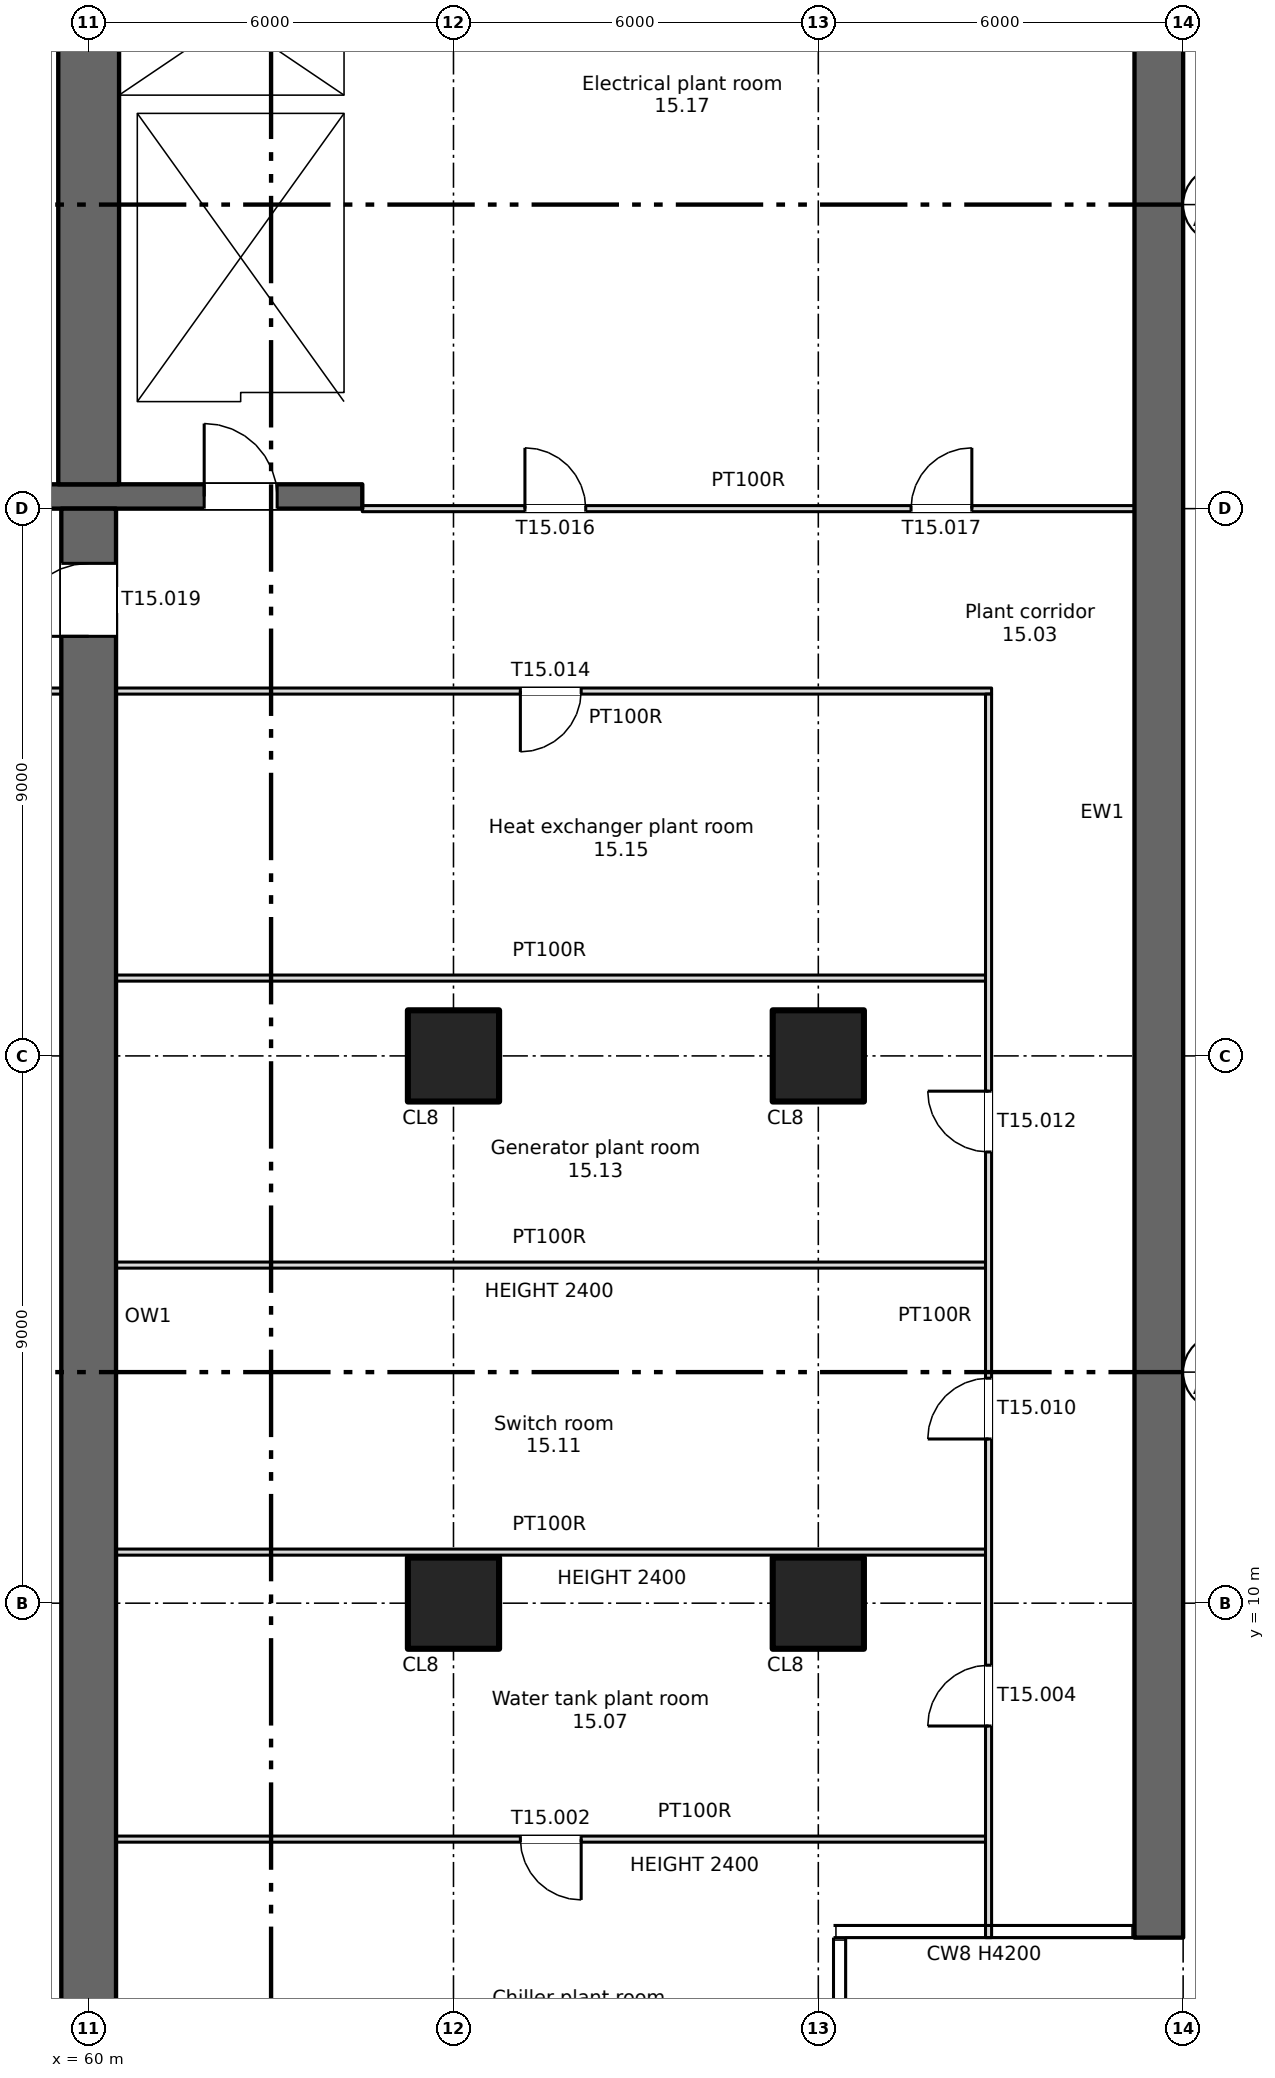
"""IFC4 building model, lengths in metres.
Left out: names, types, materials, properties, quantities, classifications, styles, units other than length and angle.
Written with IfcOpenShell. Run it as: python <this file> out.ifc"""

import sys

from ifc_helpers import new_model, si_unit, direction, frame, frame_2d, origin, origin_2d, place, context, subcontext, project, spatial, rectangle, extrude, element, fill, save


model = new_model("IFC4")
c1 = context("Model", 3, precision=1e-05, world=origin(), true_north=direction((0.0, 1.0)))
c2 = subcontext(c1, "Body", "Model", "MODEL_VIEW")
j1 = project(units=[si_unit("LENGTHUNIT", "METRE"), si_unit("PLANEANGLEUNIT", "RADIAN")], contexts=[c1])
p1 = place(None, origin())
s1 = spatial("IfcSite", under=j1, at=p1, CompositionType="ELEMENT")
p2 = place(p1, origin())
s2 = spatial("IfcBuilding", under=s1, at=p2, CompositionType="ELEMENT")
p3 = place(p2, frame((0.0, 0.0, 90.0)))
s3 = spatial("IfcBuildingStorey", under=s2, at=p3, CompositionType="ELEMENT", Elevation=90.0)
for number, where, z_axis, x_axis in (
    (1, (66.0, 10.0, 0.0), (0.0, 0.0, 1.0), (1.0, 0.0, 0.0)),
    (2, (66.0, 19.0, 0.0), (0.0, 0.0, 1.0), (1.0, 0.0, 0.0)),
    (3, (72.0, 10.0, 0.0), (0.0, 0.0, 1.0), (1.0, 0.0, 0.0)),
    (4, (72.0, 19.0, 0.0), (0.0, 0.0, 1.0), (1.0, 0.0, 0.0)),
):
    element("IfcColumn", number, at=place(p3, frame(where, z_axis=z_axis, x_axis=x_axis)), inside=s3, PredefinedType="COLUMN", context=c2, shape_type="SweptSolid", body=[
        extrude(rectangle(XDim=1.5, YDim=1.5, at=origin_2d()), origin(), (0.0, 0.0, 1.0), 4.2),
    ])
p4 = place(p3, frame((77.6, 4.5, 0.0), z_axis=(0.0, 0.0, 1.0), x_axis=(0.0, 1.0, 0.0)))
e5 = element("IfcWall", 5, at=p4, inside=s3, PredefinedType="SHEAR", context=c2, shape_type="SweptSolid", body=[
    extrude(rectangle(XDim=37.0, YDim=0.8, at=frame_2d((18.5, 0.0))), origin(), (0.0, 0.0, 1.0), 4.2),
])
p5 = place(p3, frame((60.0, 1.4, 0.0), z_axis=(0.0, 0.0, 1.0), x_axis=(0.0, 1.0, 0.0)))
e6 = element("IfcWall", 6, at=p5, inside=s3, PredefinedType="SHEAR", context=c2, shape_type="SweptSolid", body=[
    extrude(rectangle(XDim=26.6, YDim=0.9, at=frame_2d((13.3, 0.0))), origin(), (0.0, 0.0, 1.0), 4.2),
])
p6 = place(p5, frame((24.5, 0.0, 0.0)))
e7 = element("IfcOpeningElement", 7, at=p6, cuts=e6, PredefinedType="OPENING", context=c2, shape_type="SweptSolid", body=[
    extrude(rectangle(XDim=1.2, YDim=2.1, at=frame_2d((0.6, 1.05))), frame((0.0, 0.46, 0.0), z_axis=(0.0, -1.0, 0.0), x_axis=(1.0, 0.0, 0.0)), (0.0, 0.0, 1.0), 0.92),
])
p7 = place(p3, frame((6.7, 28.2, 0.0), z_axis=(0.0, 0.0, 1.0), x_axis=(1.0, 0.0, 0.0)))
e8 = element("IfcWall", 8, at=p7, inside=s3, PredefinedType="SHEAR", context=c2, shape_type="SweptSolid", body=[
    extrude(rectangle(XDim=57.8, YDim=0.4, at=frame_2d((28.9, 0.0))), origin(), (0.0, 0.0, 1.0), 4.2),
])
p8 = place(p7, frame((13.85, 0.0, 0.0)))
e9 = element("IfcOpeningElement", 9, at=p8, cuts=e8, PredefinedType="OPENING", context=c2, shape_type="SweptSolid", body=[
    extrude(rectangle(XDim=0.9, YDim=2.1, at=frame_2d((0.45, 1.05))), frame((0.0, 0.21, 0.0), z_axis=(0.0, -1.0, 0.0), x_axis=(1.0, 0.0, 0.0)), (0.0, 0.0, 1.0), 0.42),
])
p9 = place(p7, frame((49.85, 0.0, 0.0)))
e10 = element("IfcOpeningElement", 10, at=p9, cuts=e8, PredefinedType="OPENING", context=c2, shape_type="SweptSolid", body=[
    extrude(rectangle(XDim=0.9, YDim=2.1, at=frame_2d((0.45, 1.05))), frame((0.0, 0.21, 0.0), z_axis=(0.0, -1.0, 0.0), x_axis=(1.0, 0.0, 0.0)), (0.0, 0.0, 1.0), 0.42),
])
p10 = place(p7, frame((1.35, 0.0, 0.0)))
e11 = element("IfcOpeningElement", 11, at=p10, cuts=e8, PredefinedType="OPENING", context=c2, shape_type="SweptSolid", body=[
    extrude(rectangle(XDim=0.9, YDim=2.1, at=frame_2d((0.45, 1.05))), frame((0.0, 0.21, 0.0), z_axis=(0.0, -1.0, 0.0), x_axis=(1.0, 0.0, 0.0)), (0.0, 0.0, 1.0), 0.42),
])
p11 = place(p7, frame((4.7, 0.0, 0.0)))
e12 = element("IfcOpeningElement", 12, at=p11, cuts=e8, PredefinedType="OPENING", context=c2, shape_type="SweptSolid", body=[
    extrude(rectangle(XDim=1.2, YDim=2.1, at=frame_2d((0.6, 1.05))), frame((0.0, 0.21, 0.0), z_axis=(0.0, -1.0, 0.0), x_axis=(1.0, 0.0, 0.0)), (0.0, 0.0, 1.0), 0.42),
])
p12 = place(p7, frame((31.7, 0.0, 0.0)))
e13 = element("IfcOpeningElement", 13, at=p12, cuts=e8, PredefinedType="OPENING", context=c2, shape_type="SweptSolid", body=[
    extrude(rectangle(XDim=1.2, YDim=2.1, at=frame_2d((0.6, 1.05))), frame((0.0, 0.21, 0.0), z_axis=(0.0, -1.0, 0.0), x_axis=(1.0, 0.0, 0.0)), (0.0, 0.0, 1.0), 0.42),
])
p13 = place(p7, frame((55.2, 0.0, 0.0)))
e14 = element("IfcOpeningElement", 14, at=p13, cuts=e8, PredefinedType="OPENING", context=c2, shape_type="SweptSolid", body=[
    extrude(rectangle(XDim=1.2, YDim=2.1, at=frame_2d((0.6, 1.05))), frame((0.0, 0.21, 0.0), z_axis=(0.0, -1.0, 0.0), x_axis=(1.0, 0.0, 0.0)), (0.0, 0.0, 1.0), 0.42),
])
p14 = place(p7, frame((21.7, 0.0, 0.0)))
e15 = element("IfcOpeningElement", 15, at=p14, cuts=e8, PredefinedType="OPENING", context=c2, shape_type="SweptSolid", body=[
    extrude(rectangle(XDim=1.2, YDim=2.1, at=frame_2d((0.6, 1.05))), frame((0.0, 0.21, 0.0), z_axis=(0.0, -1.0, 0.0), x_axis=(1.0, 0.0, 0.0)), (0.0, 0.0, 1.0), 0.42),
])
p15 = place(p7, frame((41.7, 0.0, 0.0)))
e16 = element("IfcOpeningElement", 16, at=p15, cuts=e8, PredefinedType="OPENING", context=c2, shape_type="SweptSolid", body=[
    extrude(rectangle(XDim=1.2, YDim=2.1, at=frame_2d((0.6, 1.05))), frame((0.0, 0.21, 0.0), z_axis=(0.0, -1.0, 0.0), x_axis=(1.0, 0.0, 0.0)), (0.0, 0.0, 1.0), 0.42),
])
p16 = place(p7, frame((24.85, 0.0, 0.0)))
e17 = element("IfcOpeningElement", 17, at=p16, cuts=e8, PredefinedType="OPENING", context=c2, shape_type="SweptSolid", body=[
    extrude(rectangle(XDim=2.4, YDim=2.1, at=frame_2d((1.2, 1.05))), frame((0.0, 0.21, 0.0), z_axis=(0.0, -1.0, 0.0), x_axis=(1.0, 0.0, 0.0)), (0.0, 0.0, 1.0), 0.42),
])
p17 = place(p7, frame((37.35, 0.0, 0.0)))
e18 = element("IfcOpeningElement", 18, at=p17, cuts=e8, PredefinedType="OPENING", context=c2, shape_type="SweptSolid", body=[
    extrude(rectangle(XDim=2.4, YDim=2.1, at=frame_2d((1.2, 1.05))), frame((0.0, 0.21, 0.0), z_axis=(0.0, -1.0, 0.0), x_axis=(1.0, 0.0, 0.0)), (0.0, 0.0, 1.0), 0.42),
])
p18 = place(p7, frame((7.85, 0.0, 0.0)))
e19 = element("IfcOpeningElement", 19, at=p18, cuts=e8, PredefinedType="OPENING", context=c2, shape_type="SweptSolid", body=[
    extrude(rectangle(XDim=2.4, YDim=2.1, at=frame_2d((1.2, 1.05))), frame((0.0, 0.21, 0.0), z_axis=(0.0, -1.0, 0.0), x_axis=(1.0, 0.0, 0.0)), (0.0, 0.0, 1.0), 0.42),
])
p19 = place(p7, frame((28.85, 0.0, 0.0)))
e20 = element("IfcOpeningElement", 20, at=p19, cuts=e8, PredefinedType="OPENING", context=c2, shape_type="SweptSolid", body=[
    extrude(rectangle(XDim=0.9, YDim=2.1, at=frame_2d((0.45, 1.05))), frame((0.0, 0.21, 0.0), z_axis=(0.0, -1.0, 0.0), x_axis=(1.0, 0.0, 0.0)), (0.0, 0.0, 1.0), 0.42),
])
p20 = place(p7, frame((34.85, 0.0, 0.0)))
e21 = element("IfcOpeningElement", 21, at=p20, cuts=e8, PredefinedType="OPENING", context=c2, shape_type="SweptSolid", body=[
    extrude(rectangle(XDim=0.9, YDim=2.1, at=frame_2d((0.45, 1.05))), frame((0.0, 0.21, 0.0), z_axis=(0.0, -1.0, 0.0), x_axis=(1.0, 0.0, 0.0)), (0.0, 0.0, 1.0), 0.42),
])
p21 = place(p3, frame((64.35, 34.8, 0.0), z_axis=(0.0, 0.0, 1.0), x_axis=(0.0, 1.0, 0.0)))
e22 = element("IfcWall", 22, at=p21, inside=s3, PredefinedType="SHEAR", context=c2, shape_type="SweptSolid", body=[
    extrude(rectangle(XDim=10.2, YDim=0.3, at=frame_2d((5.1, 0.0))), origin(), (0.0, 0.0, 1.0), 4.2),
])
p22 = place(p3, frame((60.0, 28.4, 0.0), z_axis=(0.0, 0.0, 1.0), x_axis=(0.0, 1.0, 0.0)))
e23 = element("IfcWall", 23, at=p22, inside=s3, PredefinedType="SHEAR", context=c2, shape_type="SweptSolid", body=[
    extrude(rectangle(XDim=16.6, YDim=1.0, at=frame_2d((8.3, 0.0))), origin(), (0.0, 0.0, 1.0), 4.2),
])
p23 = place(p22, frame((9.6, 0.0, 0.0)))
e24 = element("IfcOpeningElement", 24, at=p23, cuts=e23, PredefinedType="OPENING", context=c2, shape_type="SweptSolid", body=[
    extrude(rectangle(XDim=2.0, YDim=2.1, at=frame_2d((1.0, 1.05))), frame((0.0, 0.51, 0.0), z_axis=(0.0, -1.0, 0.0), x_axis=(1.0, 0.0, 0.0)), (0.0, 0.0, 1.0), 1.02),
])
p24 = place(p22, frame((15.25, 0.0, 0.0)))
e25 = element("IfcOpeningElement", 25, at=p24, cuts=e23, PredefinedType="OPENING", context=c2, shape_type="SweptSolid", body=[
    extrude(rectangle(XDim=1.2, YDim=2.1, at=frame_2d((0.6, 1.05))), frame((0.0, 0.51, 0.0), z_axis=(0.0, -1.0, 0.0), x_axis=(1.0, 0.0, 0.0)), (0.0, 0.0, 1.0), 1.02),
])
for number, where, z_axis, x_axis in (
    (26, (60.65, 28.4, 0.0), (0.0, 0.0, 1.0), (0.0, 1.0, 0.0)),
    (27, (64.35, 28.4, 0.0), (0.0, 0.0, 1.0), (0.0, 1.0, 0.0)),
):
    element("IfcWall", number, at=place(p3, frame(where, z_axis=z_axis, x_axis=x_axis)), inside=s3, PredefinedType="SHEAR", context=c2, shape_type="SweptSolid", body=[
        extrude(rectangle(XDim=6.1, YDim=0.3, at=frame_2d((3.05, 0.0))), origin(), (0.0, 0.0, 1.0), 4.2),
    ])
p25 = place(p3, frame((47.3, 34.65, 0.0), z_axis=(0.0, 0.0, 1.0), x_axis=(1.0, 0.0, 0.0)))
e28 = element("IfcWall", 28, at=p25, inside=s3, PredefinedType="SHEAR", context=c2, shape_type="SweptSolid", body=[
    extrude(rectangle(XDim=12.2, YDim=0.3, at=frame_2d((6.1, 0.0))), origin(), (0.0, 0.0, 1.0), 4.2),
])
p26 = place(p25, frame((1.3, 0.0, 0.0)))
e29 = element("IfcOpeningElement", 29, at=p26, cuts=e28, PredefinedType="OPENING", context=c2, shape_type="SweptSolid", body=[
    extrude(rectangle(XDim=1.1, YDim=2.1, at=frame_2d((0.55, 1.05))), frame((0.0, 0.16, 0.0), z_axis=(0.0, -1.0, 0.0), x_axis=(1.0, 0.0, 0.0)), (0.0, 0.0, 1.0), 0.32),
])
p27 = place(p3, frame((60.5, 34.65, 0.0), z_axis=(0.0, 0.0, 1.0), x_axis=(1.0, 0.0, 0.0)))
e30 = element("IfcWall", 30, at=p27, inside=s3, PredefinedType="SHEAR", context=c2, shape_type="SweptSolid", body=[
    extrude(rectangle(XDim=4.0, YDim=0.3, at=frame_2d((2.0, 0.0))), origin(), (0.0, 0.0, 1.0), 4.2),
])
p28 = place(p3, frame((60.4, 6.12, 0.0), z_axis=(0.0, 0.0, 1.0), x_axis=(1.0, 0.0, 0.0)))
e31 = element("IfcWall", 31, at=p28, inside=s3, PredefinedType="PARTITIONING", context=c2, shape_type="SweptSolid", body=[
    extrude(rectangle(XDim=14.35, YDim=0.1, at=frame_2d((7.175, 0.0))), origin(), (0.0, 0.0, 1.0), 2.4),
])
p29 = place(p28, frame((6.7, 0.0, 0.0)))
e32 = element("IfcOpeningElement", 32, at=p29, cuts=e31, PredefinedType="OPENING", context=c2, shape_type="SweptSolid", body=[
    extrude(rectangle(XDim=1.0, YDim=2.1, at=frame_2d((0.5, 1.05))), frame((0.0, 0.06, 0.0), z_axis=(0.0, -1.0, 0.0), x_axis=(1.0, 0.0, 0.0)), (0.0, 0.0, 1.0), 0.12),
])
for number, where, z_axis, x_axis in (
    (33, (60.4, 10.84, 0.0), (0.0, 0.0, 1.0), (1.0, 0.0, 0.0)),
    (34, (60.4, 15.56, 0.0), (0.0, 0.0, 1.0), (1.0, 0.0, 0.0)),
):
    element("IfcWall", number, at=place(p3, frame(where, z_axis=z_axis, x_axis=x_axis)), inside=s3, PredefinedType="PARTITIONING", context=c2, shape_type="SweptSolid", body=[
        extrude(rectangle(XDim=14.35, YDim=0.1, at=frame_2d((7.175, 0.0))), origin(), (0.0, 0.0, 1.0), 2.4),
    ])
p30 = place(p3, frame((60.4, 20.28, 0.0), z_axis=(0.0, 0.0, 1.0), x_axis=(1.0, 0.0, 0.0)))
e35 = element("IfcWall", 35, at=p30, inside=s3, PredefinedType="PARTITIONING", context=c2, shape_type="SweptSolid", body=[
    extrude(rectangle(XDim=14.35, YDim=0.1, at=frame_2d((7.175, 0.0))), origin(), (0.0, 0.0, 1.0), 4.2),
])
p31 = place(p3, frame((46.95, 25.0, 0.0), z_axis=(0.0, 0.0, 1.0), x_axis=(1.0, 0.0, 0.0)))
e36 = element("IfcWall", 36, at=p31, inside=s3, PredefinedType="PARTITIONING", context=c2, shape_type="SweptSolid", body=[
    extrude(rectangle(XDim=12.65, YDim=0.1, at=frame_2d((6.325, 0.0))), origin(), (0.0, 0.0, 1.0), 4.2),
])
p32 = place(p3, frame((60.4, 25.0, 0.0), z_axis=(0.0, 0.0, 1.0), x_axis=(1.0, 0.0, 0.0)))
e37 = element("IfcWall", 37, at=p32, inside=s3, PredefinedType="PARTITIONING", context=c2, shape_type="SweptSolid", body=[
    extrude(rectangle(XDim=14.45, YDim=0.1, at=frame_2d((7.225, 0.0))), origin(), (0.0, 0.0, 1.0), 4.2),
])
p33 = place(p32, frame((6.7, 0.0, 0.0)))
e38 = element("IfcOpeningElement", 38, at=p33, cuts=e37, PredefinedType="OPENING", context=c2, shape_type="SweptSolid", body=[
    extrude(rectangle(XDim=1.0, YDim=2.1, at=frame_2d((0.5, 1.05))), frame((0.0, 0.06, 0.0), z_axis=(0.0, -1.0, 0.0), x_axis=(1.0, 0.0, 0.0)), (0.0, 0.0, 1.0), 0.12),
])
p34 = place(p3, frame((64.5, 28.0, 0.0), z_axis=(0.0, 0.0, 1.0), x_axis=(1.0, 0.0, 0.0)))
e39 = element("IfcWall", 39, at=p34, inside=s3, PredefinedType="PARTITIONING", context=c2, shape_type="SweptSolid", body=[
    extrude(rectangle(XDim=12.7, YDim=0.1, at=frame_2d((6.35, 0.0))), origin(), (0.0, 0.0, 1.0), 4.2),
])
p35 = place(p34, frame((2.675, 0.0, 0.0)))
e40 = element("IfcOpeningElement", 40, at=p35, cuts=e39, PredefinedType="OPENING", context=c2, shape_type="SweptSolid", body=[
    extrude(rectangle(XDim=1.0, YDim=2.1, at=frame_2d((0.5, 1.05))), frame((0.0, 0.06, 0.0), z_axis=(0.0, -1.0, 0.0), x_axis=(1.0, 0.0, 0.0)), (0.0, 0.0, 1.0), 0.12),
])
p36 = place(p34, frame((9.025, 0.0, 0.0)))
e41 = element("IfcOpeningElement", 41, at=p36, cuts=e39, PredefinedType="OPENING", context=c2, shape_type="SweptSolid", body=[
    extrude(rectangle(XDim=1.0, YDim=2.1, at=frame_2d((0.5, 1.05))), frame((0.0, 0.06, 0.0), z_axis=(0.0, -1.0, 0.0), x_axis=(1.0, 0.0, 0.0)), (0.0, 0.0, 1.0), 0.12),
])
p37 = place(p3, frame((74.8, 4.5, 0.0), z_axis=(0.0, 0.0, 1.0), x_axis=(0.0, 1.0, 0.0)))
e42 = element("IfcWall", 42, at=p37, inside=s3, PredefinedType="PARTITIONING", context=c2, shape_type="SweptSolid", body=[
    extrude(rectangle(XDim=20.45, YDim=0.1, at=frame_2d((10.225, 0.0))), origin(), (0.0, 0.0, 1.0), 4.2),
])
p38 = place(p37, frame((3.48, 0.0, 0.0)))
e43 = element("IfcOpeningElement", 43, at=p38, cuts=e42, PredefinedType="OPENING", context=c2, shape_type="SweptSolid", body=[
    extrude(rectangle(XDim=1.0, YDim=2.1, at=frame_2d((0.5, 1.05))), frame((0.0, 0.06, 0.0), z_axis=(0.0, -1.0, 0.0), x_axis=(1.0, 0.0, 0.0)), (0.0, 0.0, 1.0), 0.12),
])
p39 = place(p37, frame((8.2, 0.0, 0.0)))
e44 = element("IfcOpeningElement", 44, at=p39, cuts=e42, PredefinedType="OPENING", context=c2, shape_type="SweptSolid", body=[
    extrude(rectangle(XDim=1.0, YDim=2.1, at=frame_2d((0.5, 1.05))), frame((0.0, 0.06, 0.0), z_axis=(0.0, -1.0, 0.0), x_axis=(1.0, 0.0, 0.0)), (0.0, 0.0, 1.0), 0.12),
])
p40 = place(p37, frame((12.92, 0.0, 0.0)))
e45 = element("IfcOpeningElement", 45, at=p40, cuts=e42, PredefinedType="OPENING", context=c2, shape_type="SweptSolid", body=[
    extrude(rectangle(XDim=1.0, YDim=2.1, at=frame_2d((0.5, 1.05))), frame((0.0, 0.06, 0.0), z_axis=(0.0, -1.0, 0.0), x_axis=(1.0, 0.0, 0.0)), (0.0, 0.0, 1.0), 0.12),
])
p41 = place(p13, origin())
e46 = element("IfcDoor", 46, at=p41, inside=s3, OperationType="SINGLE_SWING_LEFT", PredefinedType="DOOR", context=c2, shape_type="SweptSolid", body=[
    extrude(rectangle(XDim=1.2, YDim=2.1, at=frame_2d((0.6, 1.05))), frame((0.0, 0.025, 0.0), z_axis=(0.0, -1.0, 0.0), x_axis=(1.0, 0.0, 0.0)), (0.0, 0.0, 1.0), 0.05),
])
fill(e14, e46)
p42 = place(p29, origin())
e47 = element("IfcDoor", 47, at=p42, inside=s3, OperationType="SINGLE_SWING_RIGHT", PredefinedType="DOOR", context=c2, shape_type="SweptSolid", body=[
    extrude(rectangle(XDim=1.0, YDim=2.1, at=frame_2d((0.5, 1.05))), frame((0.0, 0.025, 0.0), z_axis=(0.0, -1.0, 0.0), x_axis=(1.0, 0.0, 0.0)), (0.0, 0.0, 1.0), 0.05),
])
fill(e32, e47)
p43 = place(p38, origin())
e48 = element("IfcDoor", 48, at=p43, inside=s3, OperationType="SINGLE_SWING_LEFT", PredefinedType="DOOR", context=c2, shape_type="SweptSolid", body=[
    extrude(rectangle(XDim=1.0, YDim=2.1, at=frame_2d((0.5, 1.05))), frame((0.0, 0.025, 0.0), z_axis=(0.0, -1.0, 0.0), x_axis=(1.0, 0.0, 0.0)), (0.0, 0.0, 1.0), 0.05),
])
fill(e43, e48)
p44 = place(p39, origin())
e49 = element("IfcDoor", 49, at=p44, inside=s3, OperationType="SINGLE_SWING_LEFT", PredefinedType="DOOR", context=c2, shape_type="SweptSolid", body=[
    extrude(rectangle(XDim=1.0, YDim=2.1, at=frame_2d((0.5, 1.05))), frame((0.0, 0.025, 0.0), z_axis=(0.0, -1.0, 0.0), x_axis=(1.0, 0.0, 0.0)), (0.0, 0.0, 1.0), 0.05),
])
fill(e44, e49)
p45 = place(p40, origin())
e50 = element("IfcDoor", 50, at=p45, inside=s3, OperationType="SINGLE_SWING_RIGHT", PredefinedType="DOOR", context=c2, shape_type="SweptSolid", body=[
    extrude(rectangle(XDim=1.0, YDim=2.1, at=frame_2d((0.5, 1.05))), frame((0.0, 0.025, 0.0), z_axis=(0.0, -1.0, 0.0), x_axis=(1.0, 0.0, 0.0)), (0.0, 0.0, 1.0), 0.05),
])
fill(e45, e50)
p46 = place(p33, origin())
e51 = element("IfcDoor", 51, at=p46, inside=s3, OperationType="SINGLE_SWING_LEFT", PredefinedType="DOOR", context=c2, shape_type="SweptSolid", body=[
    extrude(rectangle(XDim=1.0, YDim=2.1, at=frame_2d((0.5, 1.05))), frame((0.0, 0.025, 0.0), z_axis=(0.0, -1.0, 0.0), x_axis=(1.0, 0.0, 0.0)), (0.0, 0.0, 1.0), 0.05),
])
fill(e38, e51)
p47 = place(p35, origin())
e52 = element("IfcDoor", 52, at=p47, inside=s3, OperationType="SINGLE_SWING_LEFT", PredefinedType="DOOR", context=c2, shape_type="SweptSolid", body=[
    extrude(rectangle(XDim=1.0, YDim=2.1, at=frame_2d((0.5, 1.05))), frame((0.0, 0.025, 0.0), z_axis=(0.0, -1.0, 0.0), x_axis=(1.0, 0.0, 0.0)), (0.0, 0.0, 1.0), 0.05),
])
fill(e40, e52)
p48 = place(p36, origin())
e53 = element("IfcDoor", 53, at=p48, inside=s3, OperationType="SINGLE_SWING_RIGHT", PredefinedType="DOOR", context=c2, shape_type="SweptSolid", body=[
    extrude(rectangle(XDim=1.0, YDim=2.1, at=frame_2d((0.5, 1.05))), frame((0.0, 0.025, 0.0), z_axis=(0.0, -1.0, 0.0), x_axis=(1.0, 0.0, 0.0)), (0.0, 0.0, 1.0), 0.05),
])
fill(e41, e53)
p49 = place(p6, origin())
e54 = element("IfcDoor", 54, at=p49, inside=s3, OperationType="SINGLE_SWING_LEFT", PredefinedType="DOOR", context=c2, shape_type="SweptSolid", body=[
    extrude(rectangle(XDim=1.2, YDim=2.1, at=frame_2d((0.6, 1.05))), frame((0.0, 0.025, 0.0), z_axis=(0.0, -1.0, 0.0), x_axis=(1.0, 0.0, 0.0)), (0.0, 0.0, 1.0), 0.05),
])
fill(e7, e54)
save(model, sys.argv[1])
